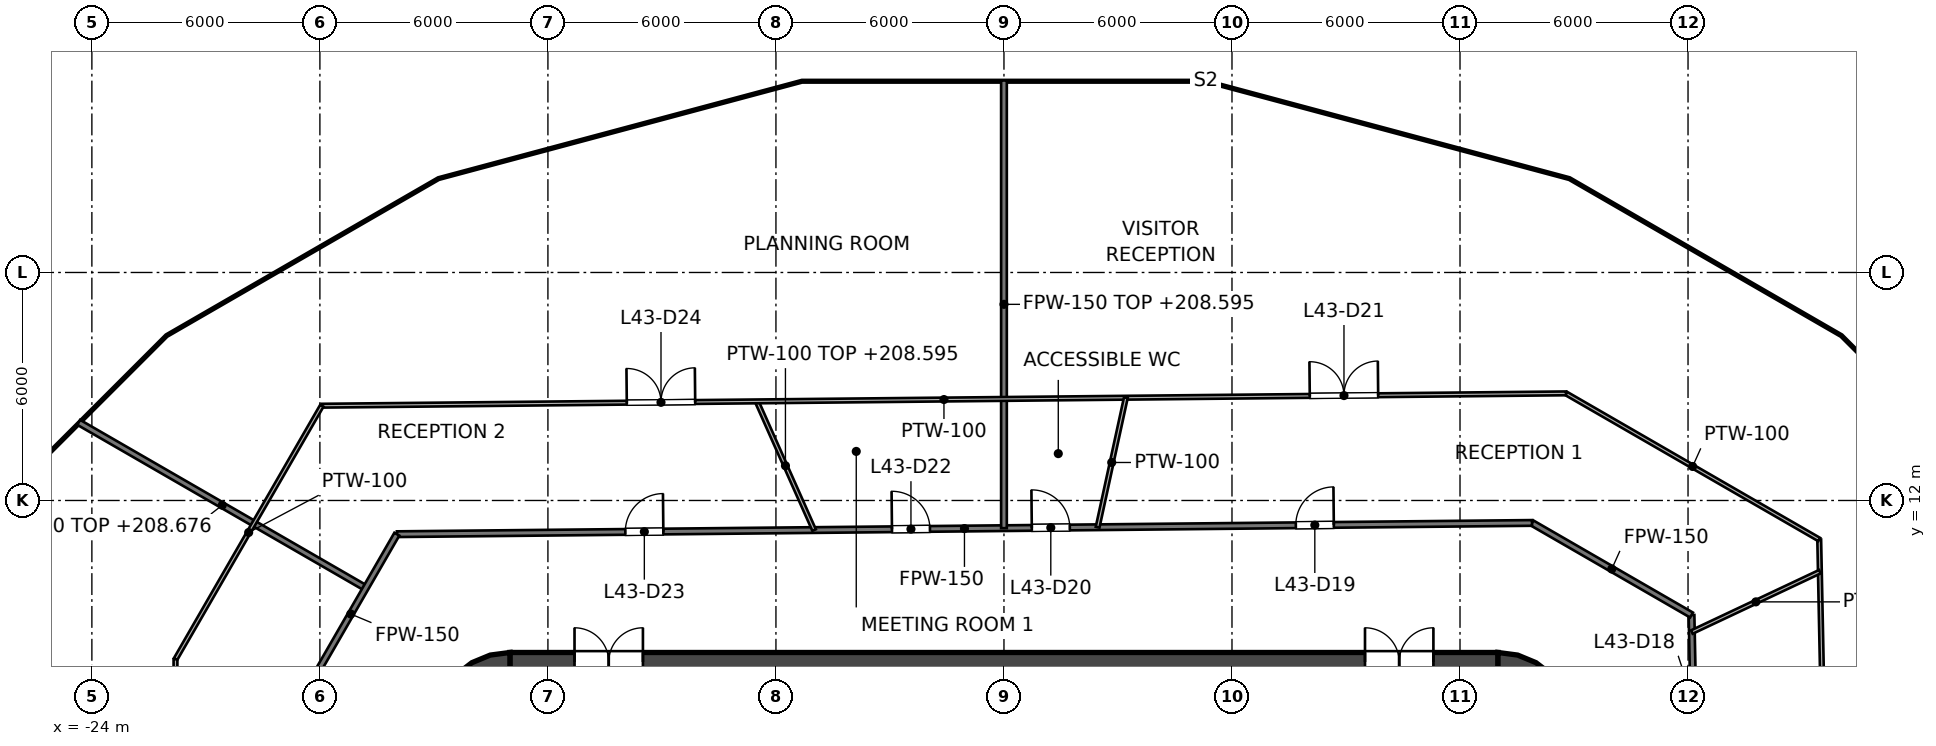
"""IFC4 building model, lengths in metres.
Left out: names, types, materials, properties, quantities, classifications, styles, units other than length and angle.
Written with IfcOpenShell. Run it as: python <this file> out.ifc"""

import sys

from ifc_helpers import new_model, si_unit, direction, frame, frame_2d, origin, place, context, subcontext, project, spatial, polyline, rectangle, outline, extrude, element, fill, save


model = new_model("IFC4")
c1 = context("Model", 3, precision=1e-05, world=origin(), true_north=direction((0.0, 1.0)))
c2 = subcontext(c1, "Body", "Model", "MODEL_VIEW")
j1 = project(units=[si_unit("LENGTHUNIT", "METRE"), si_unit("PLANEANGLEUNIT", "RADIAN")], contexts=[c1])
p1 = place(None, origin())
s1 = spatial("IfcSite", under=j1, at=p1, CompositionType="ELEMENT")
p2 = place(p1, origin())
s2 = spatial("IfcBuilding", under=s1, at=p2, CompositionType="ELEMENT")
p3 = place(p2, frame((0.0, 0.0, 203.0)))
s3 = spatial("IfcBuildingStorey", under=s2, at=p3, CompositionType="ELEMENT", Elevation=203.0)
p4 = place(p3, frame((-13.0, 7.75, 0.0), z_axis=(0.0, 0.0, 1.0), x_axis=(1.0, 0.0, 0.0)))
e1 = element("IfcWall", 1, at=p4, inside=s3, PredefinedType="SHEAR", context=c2, shape_type="SweptSolid", body=[
    extrude(rectangle(XDim=26.0, YDim=0.5, at=frame_2d((13.0, 0.0))), origin(), (0.0, 0.0, 1.0), 6.45),
])
p5 = place(p4, frame((1.7, 0.0, 0.0)))
e2 = element("IfcOpeningElement", 2, at=p5, cuts=e1, PredefinedType="OPENING", context=c2, shape_type="SweptSolid", body=[
    extrude(rectangle(XDim=1.8, YDim=2.1, at=frame_2d((0.9, 1.05))), frame((0.0, 0.25, 0.0), z_axis=(0.0, -1.0, 0.0), x_axis=(1.0, 0.0, 0.0)), (0.0, 0.0, 1.0), 0.5),
])
p6 = place(p4, frame((22.5, 0.0, 0.0)))
e3 = element("IfcOpeningElement", 3, at=p6, cuts=e1, PredefinedType="OPENING", context=c2, shape_type="SweptSolid", body=[
    extrude(rectangle(XDim=1.8, YDim=2.1, at=frame_2d((0.9, 1.05))), frame((0.0, 0.25, 0.0), z_axis=(0.0, -1.0, 0.0), x_axis=(1.0, 0.0, 0.0)), (0.0, 0.0, 1.0), 0.5),
])
p7 = place(p3, origin())
e4 = element("IfcWall", 4, at=p7, inside=s3, PredefinedType="SHEAR", context=c2, shape_type="SweptSolid", body=[
    extrude(outline(polyline([(13.0, 8.0), (13.0, 7.496), (13.387, 7.445), (13.748, 7.295), (14.058, 7.058), (14.295, 6.748), (14.445, 6.387), (14.496, 6.0), (15.0, 6.0), (14.932, 6.518), (14.732, 7.0), (14.414, 7.414), (14.0, 7.732), (13.518, 7.932), (13.0, 8.0)])), origin(), (0.0, 0.0, 1.0), 6.45),
])
e5 = element("IfcWall", 5, at=p7, inside=s3, PredefinedType="SHEAR", context=c2, shape_type="SweptSolid", body=[
    extrude(outline(polyline([(-15.0, 6.0), (-14.496, 6.0), (-14.445, 6.387), (-14.295, 6.748), (-14.058, 7.058), (-13.748, 7.295), (-13.387, 7.445), (-13.0, 7.496), (-13.0, 8.0), (-13.518, 7.932), (-14.0, 7.732), (-14.414, 7.414), (-14.732, 7.0), (-14.932, 6.518), (-15.0, 6.0)])), origin(), (0.0, 0.0, 1.0), 6.45),
])
p8 = place(p3, frame((18.092, 8.986, 0.0), z_axis=(0.0, 0.0, 1.0), x_axis=(0.020463865079, -0.999790593187, 0.0)))
e6 = element("IfcWall", 6, at=p8, inside=s3, PredefinedType="PARTITIONING", context=c2, shape_type="SweptSolid", body=[
    extrude(rectangle(XDim=15.867, YDim=0.15, at=frame_2d((7.934, 0.0))), origin(), (0.0, 0.0, 1.0), 5.518),
])
p9 = place(p8, frame((1.787, 0.0, 0.0)))
e7 = element("IfcOpeningElement", 7, at=p9, cuts=e6, PredefinedType="OPENING", context=c2, shape_type="SweptSolid", body=[
    extrude(rectangle(XDim=1.0, YDim=2.1, at=frame_2d((0.5, 1.05))), frame((0.0, 0.075, 0.0), z_axis=(0.0, -1.0, 0.0), x_axis=(1.0, 0.0, 0.0)), (0.0, 0.0, 1.0), 0.15),
])
p10 = place(p8, frame((8.756, 0.0, 0.0)))
e8 = element("IfcOpeningElement", 8, at=p10, cuts=e6, PredefinedType="OPENING", context=c2, shape_type="SweptSolid", body=[
    extrude(rectangle(XDim=1.0, YDim=2.1, at=frame_2d((0.5, 1.05))), frame((0.0, 0.075, 0.0), z_axis=(0.0, -1.0, 0.0), x_axis=(1.0, 0.0, 0.0)), (0.0, 0.0, 1.0), 0.15),
])
p11 = place(p3, frame((-24.346, 14.056, 0.0), z_axis=(0.0, 0.0, 1.0), x_axis=(0.866019164606, -0.500010806419, 0.0)))
e9 = element("IfcWall", 9, at=p11, inside=s3, PredefinedType="PARTITIONING", context=c2, shape_type="SweptSolid", body=[
    extrude(rectangle(XDim=8.721, YDim=0.15, at=frame_2d((4.361, 0.0))), origin(), (0.0, 0.0, 1.0), 5.676),
])
p12 = place(p3, frame((13.895, 11.409, 0.0), z_axis=(0.0, 0.0, 1.0), x_axis=(0.866017793092, -0.500013181875, 0.0)))
e10 = element("IfcWall", 10, at=p12, inside=s3, PredefinedType="PARTITIONING", context=c2, shape_type="SweptSolid", body=[
    extrude(rectangle(XDim=4.846, YDim=0.15, at=frame_2d((2.423, 0.0))), origin(), (0.0, 0.0, 1.0), 5.527),
])
p13 = place(p3, frame((-15.974, 11.113, 0.0), z_axis=(0.0, 0.0, 1.0), x_axis=(0.999950853314, 0.009914179568, 0.0)))
e11 = element("IfcWall", 11, at=p13, inside=s3, PredefinedType="PARTITIONING", context=c2, shape_type="SweptSolid", body=[
    extrude(rectangle(XDim=29.871, YDim=0.15, at=frame_2d((14.935, 0.0))), origin(), (0.0, 0.0, 1.0), 5.527),
])
p14 = place(p13, frame((23.655, 0.0, 0.0)))
e12 = element("IfcOpeningElement", 12, at=p14, cuts=e11, PredefinedType="OPENING", context=c2, shape_type="SweptSolid", body=[
    extrude(rectangle(XDim=1.0, YDim=2.1, at=frame_2d((0.5, 1.05))), frame((0.0, 0.075, 0.0), z_axis=(0.0, -1.0, 0.0), x_axis=(1.0, 0.0, 0.0)), (0.0, 0.0, 1.0), 0.15),
])
p15 = place(p13, frame((16.707, 0.0, 0.0)))
e13 = element("IfcOpeningElement", 13, at=p15, cuts=e11, PredefinedType="OPENING", context=c2, shape_type="SweptSolid", body=[
    extrude(rectangle(XDim=1.0, YDim=2.1, at=frame_2d((0.5, 1.05))), frame((0.0, 0.075, 0.0), z_axis=(0.0, -1.0, 0.0), x_axis=(1.0, 0.0, 0.0)), (0.0, 0.0, 1.0), 0.15),
])
p16 = place(p13, frame((13.027, 0.0, 0.0)))
e14 = element("IfcOpeningElement", 14, at=p16, cuts=e11, PredefinedType="OPENING", context=c2, shape_type="SweptSolid", body=[
    extrude(rectangle(XDim=1.0, YDim=2.1, at=frame_2d((0.5, 1.05))), frame((0.0, 0.075, 0.0), z_axis=(0.0, -1.0, 0.0), x_axis=(1.0, 0.0, 0.0)), (0.0, 0.0, 1.0), 0.15),
])
p17 = place(p13, frame((6.011, 0.0, 0.0)))
e15 = element("IfcOpeningElement", 15, at=p17, cuts=e11, PredefinedType="OPENING", context=c2, shape_type="SweptSolid", body=[
    extrude(rectangle(XDim=1.0, YDim=2.1, at=frame_2d((0.5, 1.05))), frame((0.0, 0.075, 0.0), z_axis=(0.0, -1.0, 0.0), x_axis=(1.0, 0.0, 0.0)), (0.0, 0.0, 1.0), 0.15),
])
p18 = place(p3, frame((18.177, 4.87, 0.0), z_axis=(0.0, 0.0, 1.0), x_axis=(0.965933448556, 0.258790596738, 0.0)))
e16 = element("IfcWall", 16, at=p18, inside=s3, PredefinedType="PARTITIONING", context=c2, shape_type="SweptSolid", body=[
    extrude(rectangle(XDim=11.193, YDim=0.15, at=frame_2d((5.597, 0.0))), origin(), (0.0, 0.0, 1.0), 6.127),
])
p19 = place(p3, frame((-18.4, 6.911, 0.0), z_axis=(0.0, 0.0, 1.0), x_axis=(0.49981392878, 0.866132805405, 0.0)))
e17 = element("IfcWall", 17, at=p19, inside=s3, PredefinedType="PARTITIONING", context=c2, shape_type="SweptSolid", body=[
    extrude(rectangle(XDim=4.852, YDim=0.15, at=frame_2d((2.426, 0.0))), origin(), (0.0, 0.0, 1.0), 5.527),
])
p20 = place(p3, frame((0.0, 11.271, 0.0), z_axis=(0.0, 0.0, 1.0), x_axis=(0.0, 1.0, 0.0)))
e18 = element("IfcWall", 18, at=p20, inside=s3, PredefinedType="PARTITIONING", context=c2, shape_type="SweptSolid", body=[
    extrude(rectangle(XDim=11.781, YDim=0.15, at=frame_2d((5.891, 0.0))), origin(), (0.0, 0.0, 1.0), 5.595),
])
p21 = place(p3, frame((21.452, 10.972, 0.0), z_axis=(0.0, 0.0, 1.0), x_axis=(0.020449379556, -0.999790889574, 0.0)))
e19 = element("IfcWall", 19, at=p21, inside=s3, PredefinedType="PARTITIONING", context=c2, shape_type="SweptSolid", body=[
    extrude(rectangle(XDim=18.732, YDim=0.1, at=frame_2d((9.366, 0.0))), origin(), (0.0, 0.0, 1.0), 5.518),
])
p22 = place(p21, frame((11.118, 0.0, 0.0)))
e20 = element("IfcOpeningElement", 20, at=p22, cuts=e19, PredefinedType="OPENING", context=c2, shape_type="SweptSolid", body=[
    extrude(rectangle(XDim=1.8, YDim=2.1, at=frame_2d((0.9, 1.05))), frame((0.0, 0.05, 0.0), z_axis=(0.0, -1.0, 0.0), x_axis=(1.0, 0.0, 0.0)), (0.0, 0.0, 1.0), 0.1),
])
p23 = place(p3, frame((-6.504, 14.607, 0.0), z_axis=(0.0, 0.0, 1.0), x_axis=(0.406896325869, -0.913474345559, 0.0)))
e21 = element("IfcWall", 21, at=p23, inside=s3, PredefinedType="PARTITIONING", context=c2, shape_type="SweptSolid", body=[
    extrude(rectangle(XDim=3.706, YDim=0.1, at=frame_2d((1.853, 0.0))), origin(), (0.0, 0.0, 1.0), 5.595),
])
p24 = place(p3, frame((14.79, 14.818, 0.0), z_axis=(0.0, 0.0, 1.0), x_axis=(0.866027558591, -0.499996267748, 0.0)))
e22 = element("IfcWall", 22, at=p24, inside=s3, PredefinedType="PARTITIONING", context=c2, shape_type="SweptSolid", body=[
    extrude(rectangle(XDim=7.692, YDim=0.1, at=frame_2d((3.846, 0.0))), origin(), (0.0, 0.0, 1.0), 5.527),
])
p25 = place(p3, frame((-17.948, 14.494, 0.0), z_axis=(0.0, 0.0, 1.0), x_axis=(0.999950742898, 0.009925309958, 0.0)))
e23 = element("IfcWall", 23, at=p25, inside=s3, PredefinedType="PARTITIONING", context=c2, shape_type="SweptSolid", body=[
    extrude(rectangle(XDim=32.74, YDim=0.1, at=frame_2d((16.37, 0.0))), origin(), (0.0, 0.0, 1.0), 5.527),
])
p26 = place(p25, frame((25.996, 0.0, 0.0)))
e24 = element("IfcOpeningElement", 24, at=p26, cuts=e23, PredefinedType="OPENING", context=c2, shape_type="SweptSolid", body=[
    extrude(rectangle(XDim=1.8, YDim=2.1, at=frame_2d((0.9, 1.05))), frame((0.0, 0.05, 0.0), z_axis=(0.0, -1.0, 0.0), x_axis=(1.0, 0.0, 0.0)), (0.0, 0.0, 1.0), 0.1),
])
p27 = place(p25, frame((8.024, 0.0, 0.0)))
e25 = element("IfcOpeningElement", 25, at=p27, cuts=e23, PredefinedType="OPENING", context=c2, shape_type="SweptSolid", body=[
    extrude(rectangle(XDim=1.8, YDim=2.1, at=frame_2d((0.9, 1.05))), frame((0.0, 0.05, 0.0), z_axis=(0.0, -1.0, 0.0), x_axis=(1.0, 0.0, 0.0)), (0.0, 0.0, 1.0), 0.1),
])
p28 = place(p3, frame((18.101, 8.538, 0.0), z_axis=(0.0, 0.0, 1.0), x_axis=(0.904509384474, 0.426453717769, 0.0)))
e26 = element("IfcWall", 26, at=p28, inside=s3, PredefinedType="PARTITIONING", context=c2, shape_type="SweptSolid", body=[
    extrude(rectangle(XDim=3.723, YDim=0.1, at=frame_2d((1.862, 0.0))), origin(), (0.0, 0.0, 1.0), 5.7),
])
p29 = place(p3, frame((-21.8, 7.822, 0.0), z_axis=(0.0, 0.0, 1.0), x_axis=(0.499942825872, 0.866058410766, 0.0)))
e27 = element("IfcWall", 27, at=p29, inside=s3, PredefinedType="PARTITIONING", context=c2, shape_type="SweptSolid", body=[
    extrude(rectangle(XDim=7.704, YDim=0.1, at=frame_2d((3.852, 0.0))), origin(), (0.0, 0.0, 1.0), 5.527),
])
p30 = place(p3, frame((2.464, 11.296, 0.0), z_axis=(0.0, 0.0, 1.0), x_axis=(0.212978790234, 0.977056822764, 0.0)))
e28 = element("IfcWall", 28, at=p30, inside=s3, PredefinedType="PARTITIONING", context=c2, shape_type="SweptSolid", body=[
    extrude(rectangle(XDim=3.488, YDim=0.1, at=frame_2d((1.744, 0.0))), origin(), (0.0, 0.0, 1.0), 5.527),
])
p31 = place(p3, frame((-21.8, -7.354, 0.0), z_axis=(0.0, 0.0, 1.0), x_axis=(0.0, 1.0, 0.0)))
e29 = element("IfcWall", 29, at=p31, inside=s3, PredefinedType="PARTITIONING", context=c2, shape_type="SweptSolid", body=[
    extrude(rectangle(XDim=15.176, YDim=0.1, at=frame_2d((7.588, 0.0))), origin(), (0.0, 0.0, 1.0), 5.518),
])
p32 = place(p31, frame((7.445, 0.0, 0.0)))
e30 = element("IfcOpeningElement", 30, at=p32, cuts=e29, PredefinedType="OPENING", context=c2, shape_type="SweptSolid", body=[
    extrude(rectangle(XDim=1.8, YDim=2.1, at=frame_2d((0.9, 1.05))), frame((0.0, 0.05, 0.0), z_axis=(0.0, -1.0, 0.0), x_axis=(1.0, 0.0, 0.0)), (0.0, 0.0, 1.0), 0.1),
])
p33 = place(p5, origin())
e31 = element("IfcDoor", 31, at=p33, inside=s3, OperationType="DOUBLE_DOOR_SINGLE_SWING", PredefinedType="DOOR", context=c2, shape_type="SweptSolid", body=[
    extrude(rectangle(XDim=1.8, YDim=2.1, at=frame_2d((0.9, 1.05))), frame((0.0, 0.025, 0.0), z_axis=(0.0, -1.0, 0.0), x_axis=(1.0, 0.0, 0.0)), (0.0, 0.0, 1.0), 0.05),
])
fill(e2, e31)
p34 = place(p6, origin())
e32 = element("IfcDoor", 32, at=p34, inside=s3, OperationType="DOUBLE_DOOR_SINGLE_SWING", PredefinedType="DOOR", context=c2, shape_type="SweptSolid", body=[
    extrude(rectangle(XDim=1.8, YDim=2.1, at=frame_2d((0.9, 1.05))), frame((0.0, 0.025, 0.0), z_axis=(0.0, -1.0, 0.0), x_axis=(1.0, 0.0, 0.0)), (0.0, 0.0, 1.0), 0.05),
])
fill(e3, e32)
p35 = place(p14, origin())
e33 = element("IfcDoor", 33, at=p35, inside=s3, OperationType="SINGLE_SWING_RIGHT", PredefinedType="DOOR", context=c2, shape_type="SweptSolid", body=[
    extrude(rectangle(XDim=1.0, YDim=2.1, at=frame_2d((0.5, 1.05))), frame((0.0, 0.025, 0.0), z_axis=(0.0, -1.0, 0.0), x_axis=(1.0, 0.0, 0.0)), (0.0, 0.0, 1.0), 0.05),
])
fill(e12, e33)
p36 = place(p15, origin())
e34 = element("IfcDoor", 34, at=p36, inside=s3, OperationType="SINGLE_SWING_LEFT", PredefinedType="DOOR", context=c2, shape_type="SweptSolid", body=[
    extrude(rectangle(XDim=1.0, YDim=2.1, at=frame_2d((0.5, 1.05))), frame((0.0, 0.025, 0.0), z_axis=(0.0, -1.0, 0.0), x_axis=(1.0, 0.0, 0.0)), (0.0, 0.0, 1.0), 0.05),
])
fill(e13, e34)
p37 = place(p26, origin())
e35 = element("IfcDoor", 35, at=p37, inside=s3, OperationType="DOUBLE_DOOR_SINGLE_SWING", PredefinedType="DOOR", context=c2, shape_type="SweptSolid", body=[
    extrude(rectangle(XDim=1.8, YDim=2.1, at=frame_2d((0.9, 1.05))), frame((0.0, 0.025, 0.0), z_axis=(0.0, -1.0, 0.0), x_axis=(1.0, 0.0, 0.0)), (0.0, 0.0, 1.0), 0.05),
])
fill(e24, e35)
p38 = place(p16, origin())
e36 = element("IfcDoor", 36, at=p38, inside=s3, OperationType="SINGLE_SWING_LEFT", PredefinedType="DOOR", context=c2, shape_type="SweptSolid", body=[
    extrude(rectangle(XDim=1.0, YDim=2.1, at=frame_2d((0.5, 1.05))), frame((0.0, 0.025, 0.0), z_axis=(0.0, -1.0, 0.0), x_axis=(1.0, 0.0, 0.0)), (0.0, 0.0, 1.0), 0.05),
])
fill(e14, e36)
p39 = place(p17, origin())
e37 = element("IfcDoor", 37, at=p39, inside=s3, OperationType="SINGLE_SWING_RIGHT", PredefinedType="DOOR", context=c2, shape_type="SweptSolid", body=[
    extrude(rectangle(XDim=1.0, YDim=2.1, at=frame_2d((0.5, 1.05))), frame((0.0, 0.025, 0.0), z_axis=(0.0, -1.0, 0.0), x_axis=(1.0, 0.0, 0.0)), (0.0, 0.0, 1.0), 0.05),
])
fill(e15, e37)
p40 = place(p27, origin())
e38 = element("IfcDoor", 38, at=p40, inside=s3, OperationType="DOUBLE_DOOR_SINGLE_SWING", PredefinedType="DOOR", context=c2, shape_type="SweptSolid", body=[
    extrude(rectangle(XDim=1.8, YDim=2.1, at=frame_2d((0.9, 1.05))), frame((0.0, 0.025, 0.0), z_axis=(0.0, -1.0, 0.0), x_axis=(1.0, 0.0, 0.0)), (0.0, 0.0, 1.0), 0.05),
])
fill(e25, e38)
save(model, sys.argv[1])
